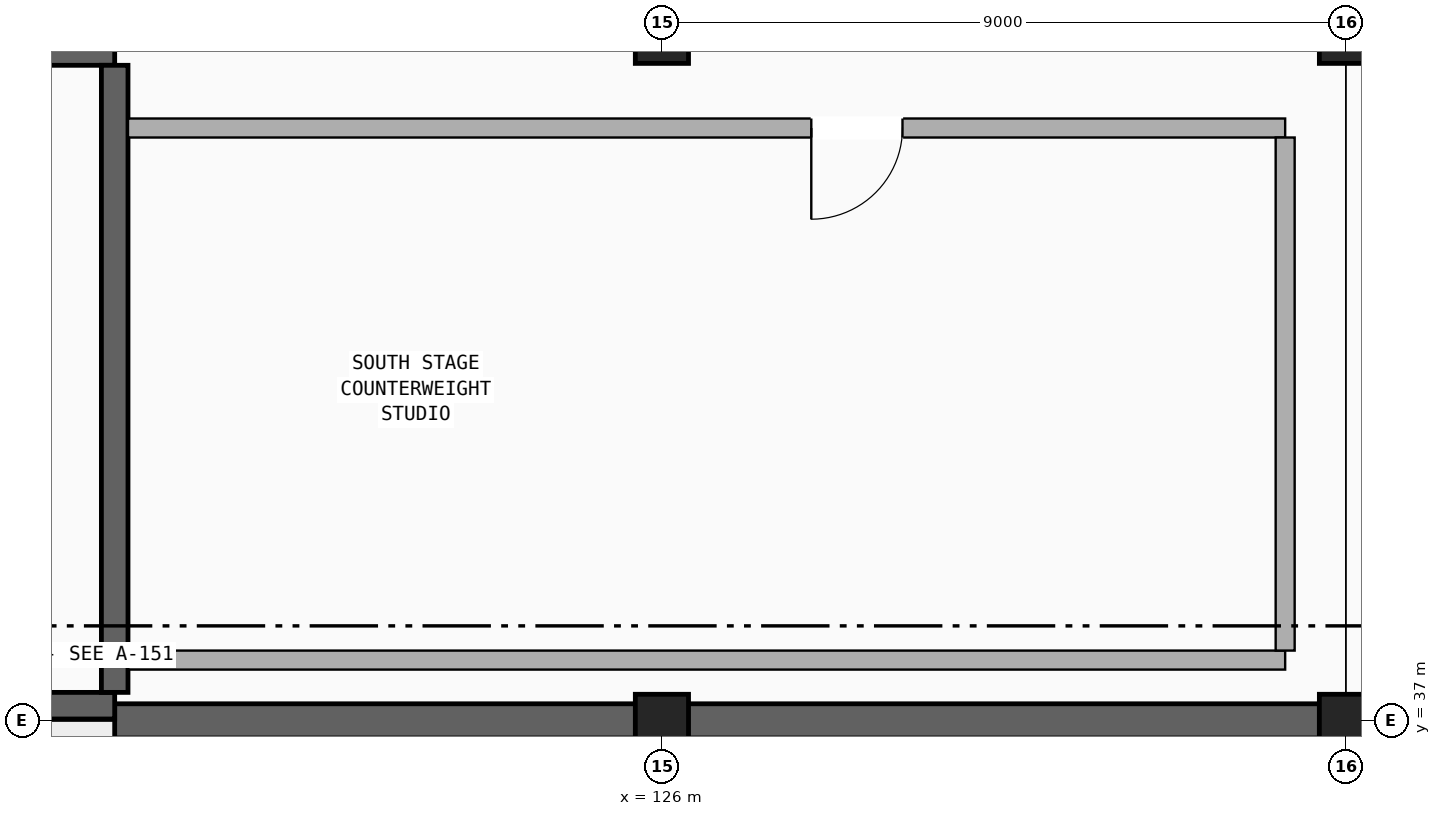
"""IFC4 building model, lengths in metres.
Left out: names, types, materials, properties, quantities, classifications, styles, units other than length and angle.
Written with IfcOpenShell. Run it as: python <this file> out.ifc"""

import sys

from ifc_helpers import new_model, si_unit, direction, frame, frame_2d, origin, origin_2d, place, context, subcontext, project, spatial, rectangle, extrude, element, fill, save


model = new_model("IFC4")
c1 = context("Model", 3, precision=1e-05, world=origin(), true_north=direction((0.0, 1.0)))
c2 = subcontext(c1, "Body", "Model", "MODEL_VIEW")
j1 = project(units=[si_unit("LENGTHUNIT", "METRE"), si_unit("PLANEANGLEUNIT", "RADIAN")], contexts=[c1])
p1 = place(None, origin())
s1 = spatial("IfcSite", under=j1, at=p1, CompositionType="ELEMENT")
p2 = place(p1, origin())
s2 = spatial("IfcBuilding", under=s1, at=p2, CompositionType="ELEMENT")
p3 = place(p2, frame((0.0, 0.0, 13.6)))
s3 = spatial("IfcBuildingStorey", under=s2, at=p3, CompositionType="ELEMENT", Elevation=13.6)
for number, where, z_axis, x_axis in (
    (1, (126.0, 37.0, 0.0), (0.0, 0.0, 1.0), (1.0, 0.0, 0.0)),
    (2, (126.0, 46.0, 0.0), (0.0, 0.0, 1.0), (1.0, 0.0, 0.0)),
    (3, (135.0, 37.0, 0.0), (0.0, 0.0, 1.0), (1.0, 0.0, 0.0)),
    (4, (135.0, 46.0, 0.0), (0.0, 0.0, 1.0), (1.0, 0.0, 0.0)),
):
    element("IfcColumn", number, at=place(p3, frame(where, z_axis=z_axis, x_axis=x_axis)), inside=s3, PredefinedType="COLUMN", context=c2, shape_type="SweptSolid", body=[
        extrude(rectangle(XDim=0.7, YDim=0.7, at=origin_2d()), origin(), (0.0, 0.0, 1.0), 4.08),
    ])
p4 = place(p3, frame((118.8, 37.0, 0.0), z_axis=(0.0, 0.0, 1.0), x_axis=(1.0, 0.0, 0.0)))
e5 = element("IfcWall", 5, at=p4, inside=s3, PredefinedType="SHEAR", context=c2, shape_type="SweptSolid", body=[
    extrude(rectangle(XDim=15.85, YDim=0.45, at=frame_2d((7.925, 0.0))), origin(), (0.0, 0.0, 1.0), 4.08),
])
p5 = place(p3, frame((108.5, 37.2, 0.0), z_axis=(0.0, 0.0, 1.0), x_axis=(1.0, 0.0, 0.0)))
e6 = element("IfcWall", 6, at=p5, inside=s3, PredefinedType="SHEAR", context=c2, shape_type="SweptSolid", body=[
    extrude(rectangle(XDim=10.3, YDim=0.35, at=frame_2d((5.15, 0.0))), origin(), (0.0, 0.0, 1.0), 4.08),
])
p6 = place(p3, frame((108.5, 45.8, 0.0), z_axis=(0.0, 0.0, 1.0), x_axis=(1.0, 0.0, 0.0)))
e7 = element("IfcWall", 7, at=p6, inside=s3, PredefinedType="SHEAR", context=c2, shape_type="SweptSolid", body=[
    extrude(rectangle(XDim=10.3, YDim=0.35, at=frame_2d((5.15, 0.0))), origin(), (0.0, 0.0, 1.0), 4.08),
])
p7 = place(p6, frame((0.45, 0.0, 0.0)))
e8 = element("IfcOpeningElement", 8, at=p7, cuts=e7, PredefinedType="OPENING", context=c2, shape_type="SweptSolid", body=[
    extrude(rectangle(XDim=1.1, YDim=2.2, at=frame_2d((0.55, 1.1))), frame((0.0, 0.185, 0.0), z_axis=(0.0, -1.0, 0.0), x_axis=(1.0, 0.0, 0.0)), (0.0, 0.0, 1.0), 0.37),
])
p8 = place(p6, frame((4.475, 0.0, 0.0)))
e9 = element("IfcOpeningElement", 9, at=p8, cuts=e7, PredefinedType="OPENING", context=c2, shape_type="SweptSolid", body=[
    extrude(rectangle(XDim=1.65, YDim=2.34, at=frame_2d((0.825, 1.17))), frame((0.0, 0.185, 0.0), z_axis=(0.0, -1.0, 0.0), x_axis=(1.0, 0.0, 0.0)), (0.0, 0.0, 1.0), 0.37),
])
p9 = place(p3, frame((118.8, 37.375, 0.0), z_axis=(0.0, 0.0, 1.0), x_axis=(0.0, 1.0, 0.0)))
e10 = element("IfcWall", 10, at=p9, inside=s3, PredefinedType="SHEAR", context=c2, shape_type="SweptSolid", body=[
    extrude(rectangle(XDim=8.25, YDim=0.35, at=frame_2d((4.125, 0.0))), origin(), (0.0, 0.0, 1.0), 4.08),
])
p10 = place(p3, frame((118.975, 37.8, 0.0), z_axis=(0.0, 0.0, 1.0), x_axis=(1.0, 0.0, 0.0)))
e11 = element("IfcWall", 11, at=p10, inside=s3, PredefinedType="PARTITIONING", context=c2, shape_type="SweptSolid", body=[
    extrude(rectangle(XDim=15.225, YDim=0.25, at=frame_2d((7.612, 0.0))), origin(), (0.0, 0.0, 1.0), 3.14),
])
p11 = place(p3, frame((118.975, 44.8, 0.0), z_axis=(0.0, 0.0, 1.0), x_axis=(1.0, 0.0, 0.0)))
e12 = element("IfcWall", 12, at=p11, inside=s3, PredefinedType="PARTITIONING", context=c2, shape_type="SweptSolid", body=[
    extrude(rectangle(XDim=15.225, YDim=0.25, at=frame_2d((7.612, 0.0))), origin(), (0.0, 0.0, 1.0), 3.14),
])
p12 = place(p11, frame((8.99, 0.0, 0.0)))
e13 = element("IfcOpeningElement", 13, at=p12, cuts=e12, PredefinedType="OPENING", context=c2, shape_type="SweptSolid", body=[
    extrude(rectangle(XDim=1.2, YDim=2.2, at=frame_2d((0.6, 1.1))), frame((0.0, 0.135, 0.0), z_axis=(0.0, -1.0, 0.0), x_axis=(1.0, 0.0, 0.0)), (0.0, 0.0, 1.0), 0.27),
])
p13 = place(p3, frame((134.2, 37.925, 0.0), z_axis=(0.0, 0.0, 1.0), x_axis=(0.0, 1.0, 0.0)))
e14 = element("IfcWall", 14, at=p13, inside=s3, PredefinedType="PARTITIONING", context=c2, shape_type="SweptSolid", body=[
    extrude(rectangle(XDim=6.75, YDim=0.25, at=frame_2d((3.375, 0.0))), origin(), (0.0, 0.0, 1.0), 3.403),
])
p14 = place(p12, frame((1.2, 0.0, 0.0), z_axis=(0.0, 0.0, 1.0), x_axis=(-1.0, 0.0, 0.0)))
e15 = element("IfcDoor", 15, at=p14, inside=s3, OperationType="SINGLE_SWING_RIGHT", PredefinedType="DOOR", context=c2, shape_type="SweptSolid", body=[
    extrude(rectangle(XDim=1.2, YDim=2.2, at=frame_2d((0.6, 1.1))), frame((0.0, 0.025, 0.0), z_axis=(0.0, -1.0, 0.0), x_axis=(1.0, 0.0, 0.0)), (0.0, 0.0, 1.0), 0.05),
])
fill(e13, e15)
save(model, sys.argv[1])
